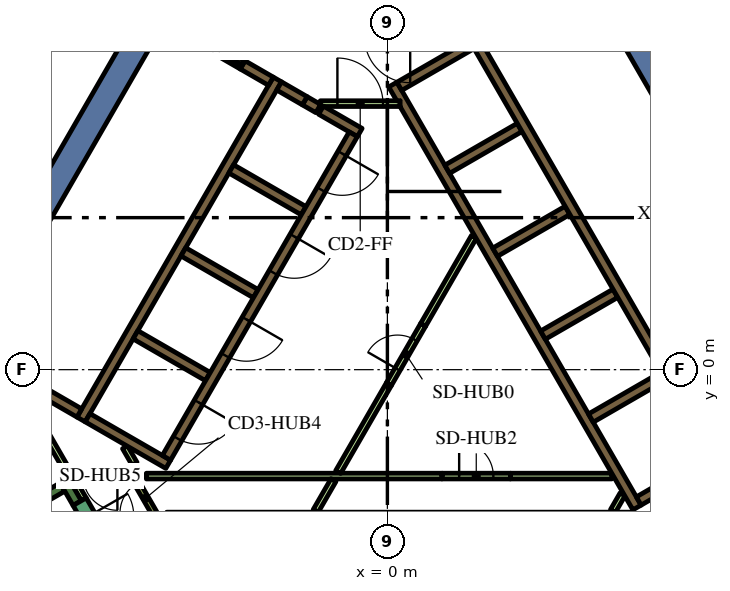
"""IFC4 building model, lengths in metres.
Left out: names, types, materials, properties, quantities, classifications, styles, units other than length and angle.
Written with IfcOpenShell. Run it as: python <this file> out.ifc"""

import sys

from ifc_helpers import new_model, si_unit, direction, frame, frame_2d, origin, place, context, subcontext, project, spatial, polyline, rectangle, outline, extrude, element, fill, save


model = new_model("IFC4")
c1 = context("Model", 3, precision=1e-05, world=origin(), true_north=direction((0.0, 1.0)))
c2 = subcontext(c1, "Body", "Model", "MODEL_VIEW")
j1 = project(units=[si_unit("LENGTHUNIT", "METRE"), si_unit("PLANEANGLEUNIT", "RADIAN")], contexts=[c1])
p1 = place(None, origin())
s1 = spatial("IfcSite", under=j1, at=p1, CompositionType="ELEMENT")
p2 = place(p1, origin())
s2 = spatial("IfcBuilding", under=s1, at=p2, CompositionType="ELEMENT")
p3 = place(p2, frame((0.0, 0.0, 214.2)))
s3 = spatial("IfcBuildingStorey", under=s2, at=p3, CompositionType="ELEMENT", Elevation=214.2)
p4 = place(p3, frame((8.235, 5.736, 0.0), z_axis=(0.0, 0.0, 1.0), x_axis=(-0.499983401189, 0.8660349869, 0.0)))
e1 = element("IfcWall", 1, at=p4, inside=s3, PredefinedType="SOLIDWALL", context=c2, shape_type="SweptSolid", body=[
    extrude(rectangle(XDim=12.472, YDim=0.7, at=frame_2d((6.236, 0.0))), origin(), (0.0, 0.0, 1.0), 4.2),
])
p5 = place(p3, frame((-4.696, 11.867, 0.0), z_axis=(0.0, 0.0, 1.0), x_axis=(-0.500003726532, -0.866023252259, 0.0)))
e2 = element("IfcWall", 2, at=p5, inside=s3, PredefinedType="SOLIDWALL", context=c2, shape_type="SweptSolid", body=[
    extrude(rectangle(XDim=12.848, YDim=0.7, at=frame_2d((6.424, 0.0))), origin(), (0.0, 0.0, 1.0), 4.2),
])
p6 = place(p3, frame((-14.44, -6.49, 0.0), z_axis=(0.0, 0.0, 1.0), x_axis=(0.866022966069, 0.500004222222, 0.0)))
e3 = element("IfcWall", 3, at=p6, inside=s3, PredefinedType="SOLIDWALL", context=c2, shape_type="SweptSolid", body=[
    extrude(rectangle(XDim=6.8, YDim=0.25, at=frame_2d((3.4, 0.0))), origin(), (0.0, 0.0, 1.0), 4.2),
])
p7 = place(p3, frame((-8.163, -3.511, 0.0), z_axis=(0.0, 0.0, 1.0), x_axis=(-0.499994068514, 0.866028828302, 0.0)))
e4 = element("IfcWall", 4, at=p7, inside=s3, PredefinedType="SOLIDWALL", context=c2, shape_type="SweptSolid", body=[
    extrude(rectangle(XDim=0.674, YDim=0.25, at=frame_2d((0.337, 0.0))), origin(), (0.0, 0.0, 1.0), 4.2),
])
p8 = place(p3, origin())
e5 = element("IfcWall", 5, at=p8, inside=s3, PredefinedType="SOLIDWALL", context=c2, shape_type="SweptSolid", body=[
    extrude(outline(polyline([(0.332, 6.925), (0.335, 6.925), (0.335, 6.925), (0.335, 6.925), (0.335, 7.075), (0.335, 7.075), (0.335, 7.075), (0.245, 7.075), (0.035, 7.439), (0.252, 7.564), (0.377, 7.348), (1.512, 5.382), (1.637, 5.165), (2.221, 4.153), (2.771, 3.199), (2.896, 2.983), (3.138, 2.564), (4.031, 1.017), (4.156, 0.801), (5.292, -1.165), (5.417, -1.382), (6.073, -2.519), (6.552, -3.348), (6.677, -3.564), (6.46, -3.689), (0.332, 6.925)])), origin(), (0.0, 0.0, 1.0), 4.2),
])
p9 = place(p3, frame((3.1, 9.064, 0.0), z_axis=(0.0, 0.0, 1.0), x_axis=(-0.866030133475, -0.499991807846, 0.0)))
e6 = element("IfcWall", 6, at=p9, inside=s3, PredefinedType="SOLIDWALL", context=c2, shape_type="SweptSolid", body=[
    extrude(rectangle(XDim=3.217, YDim=0.25, at=frame_2d((1.608, 0.0))), origin(), (0.0, 0.0, 1.0), 4.2),
])
p10 = place(p3, frame((1.574, 5.274, 0.0), z_axis=(0.0, 0.0, 1.0), x_axis=(0.866028486751, 0.499994660107, 0.0)))
e7 = element("IfcWall", 7, at=p10, inside=s3, PredefinedType="SOLIDWALL", context=c2, shape_type="SweptSolid", body=[
    extrude(rectangle(XDim=2.2, YDim=0.25, at=frame_2d((1.1, 0.0))), origin(), (0.0, 0.0, 1.0), 4.2),
])
for number, where, z_axis, x_axis in (
    (8, (2.834, 3.091, 0.0), (0.0, 0.0, 1.0), (0.866, 0.5, 0.0)),
    (9, (4.094, 0.909, 0.0), (0.0, 0.0, 1.0), (0.866, 0.5, 0.0)),
    (10, (5.354, -1.274, 0.0), (0.0, 0.0, 1.0), (0.866, 0.5, 0.0)),
):
    element("IfcWall", number, at=place(p3, frame(where, z_axis=z_axis, x_axis=x_axis)), inside=s3, PredefinedType="SOLIDWALL", context=c2, shape_type="SweptSolid", body=[
        extrude(rectangle(XDim=2.2, YDim=0.25, at=frame_2d((1.1, 0.0))), origin(), (0.0, 0.0, 1.0), 4.2),
    ])
p11 = place(p3, frame((11.507, -0.631, 0.0), z_axis=(0.0, 0.0, 1.0), x_axis=(-0.866011447264, -0.500024172624, 0.0)))
e11 = element("IfcWall", 11, at=p11, inside=s3, PredefinedType="SOLIDWALL", context=c2, shape_type="SweptSolid", body=[
    extrude(rectangle(XDim=5.65, YDim=0.25, at=frame_2d((2.825, 0.0))), origin(), (0.0, 0.0, 1.0), 4.2),
])
p12 = place(p3, frame((-8.06, -1.311, 0.0), z_axis=(0.0, 0.0, 1.0), x_axis=(0.50000273126, 0.866023826885, 0.0)))
e12 = element("IfcWall", 12, at=p12, inside=s3, PredefinedType="SOLIDWALL", context=c2, shape_type="SweptSolid", body=[
    extrude(rectangle(XDim=10.33, YDim=0.25, at=frame_2d((5.165, 0.0))), origin(), (0.0, 0.0, 1.0), 4.2),
])
p13 = place(p3, frame((-1.819, 6.87, 0.0), z_axis=(0.0, 0.0, 1.0), x_axis=(-0.866294599386, 0.499533449405, 0.0)))
e13 = element("IfcWall", 13, at=p13, inside=s3, PredefinedType="SOLIDWALL", context=c2, shape_type="SweptSolid", body=[
    extrude(rectangle(XDim=0.41, YDim=0.25, at=frame_2d((0.205, 0.0))), origin(), (0.0, 0.0, 1.0), 4.2),
])
p14 = place(p3, frame((-2.849, 7.465, 0.0), z_axis=(0.0, 0.0, 1.0), x_axis=(0.865955664968, -0.500120771724, 0.0)))
e14 = element("IfcWall", 14, at=p14, inside=s3, PredefinedType="SOLIDWALL", context=c2, shape_type="SweptSolid", body=[
    extrude(rectangle(XDim=0.778, YDim=0.25, at=frame_2d((0.389, 0.0))), origin(), (0.0, 0.0, 1.0), 4.2),
])
p15 = place(p3, frame((-0.728, 6.24, 0.0), z_axis=(0.0, 0.0, 1.0), x_axis=(-0.866002680491, 0.500039355833, 0.0)))
e15 = element("IfcWall", 15, at=p15, inside=s3, PredefinedType="SOLIDWALL", context=c2, shape_type="SweptSolid", body=[
    extrude(rectangle(XDim=1.178, YDim=0.25, at=frame_2d((0.589, 0.0))), origin(), (0.0, 0.0, 1.0), 4.2),
])
for number, where, z_axis, x_axis in (
    (16, (-2.204, 4.182, 0.0), (0.0, 0.0, 1.0), (-0.866, 0.5, 0.0)),
    (17, (-5.369, 3.1, 0.0), (0.0, 0.0, 1.0), (0.866, -0.5, 0.0)),
    (18, (-4.724, -0.182, 0.0), (0.0, 0.0, 1.0), (-0.866, 0.5, 0.0)),
):
    element("IfcWall", number, at=place(p3, frame(where, z_axis=z_axis, x_axis=x_axis)), inside=s3, PredefinedType="SOLIDWALL", context=c2, shape_type="SweptSolid", body=[
        extrude(rectangle(XDim=2.2, YDim=0.25, at=frame_2d((1.1, 0.0))), origin(), (0.0, 0.0, 1.0), 4.2),
    ])
p16 = place(p3, frame((-7.889, -1.265, 0.0), z_axis=(0.0, 0.0, 1.0), x_axis=(0.866057815567, -0.499943856944, 0.0)))
e19 = element("IfcWall", 19, at=p16, inside=s3, PredefinedType="SOLIDWALL", context=c2, shape_type="SweptSolid", body=[
    extrude(rectangle(XDim=2.45, YDim=0.25, at=frame_2d((1.225, 0.0))), origin(), (0.0, 0.0, 1.0), 4.2),
])
p17 = place(p3, frame((-9.95, -0.075, 0.0), z_axis=(0.0, 0.0, 1.0), x_axis=(0.865962177421, -0.500109495288, 0.0)))
e20 = element("IfcWall", 20, at=p17, inside=s3, PredefinedType="SOLIDWALL", context=c2, shape_type="SweptSolid", body=[
    extrude(rectangle(XDim=2.129, YDim=0.25, at=frame_2d((1.065, 0.0))), origin(), (0.0, 0.0, 1.0), 4.2),
])
p18 = place(p3, frame((-3.809, 8.019, 0.0), z_axis=(0.0, 0.0, 1.0), x_axis=(0.866010229787, -0.500026281214, 0.0)))
e21 = element("IfcWall", 21, at=p18, inside=s3, PredefinedType="SOLIDWALL", context=c2, shape_type="SweptSolid", body=[
    extrude(rectangle(XDim=0.858, YDim=0.25, at=frame_2d((0.429, 0.0))), origin(), (0.0, 0.0, 1.0), 4.2),
])
e22 = element("IfcWall", 22, at=p8, inside=s3, PredefinedType="SOLIDWALL", context=c2, shape_type="SweptSolid", body=[
    extrude(outline(polyline([(-3.748, 8.128), (-3.813, 8.015), (-4.027, 8.139), (-4.017, 8.156), (-4.008, 8.173), (-4.0, 8.192), (-3.995, 8.21), (-3.991, 8.23), (-3.99, 8.25), (-3.99, 8.268), (-3.748, 8.128)])), origin(), (0.0, 0.0, 1.0), 4.2),
])
p19 = place(p3, frame((-9.718, -0.417, 0.0), z_axis=(0.0, 0.0, 1.0), x_axis=(0.499966538646, -0.866044721844, 0.0)))
e23 = element("IfcWall", 23, at=p19, inside=s3, PredefinedType="PARTITIONING", context=c2, shape_type="SweptSolid", body=[
    extrude(rectangle(XDim=2.511, YDim=0.15, at=frame_2d((1.255, 0.0))), origin(), (0.0, 0.0, 1.0), 3.45),
])
p20 = place(p3, frame((0.941, 1.179, 0.0), z_axis=(0.0, 0.0, 1.0), x_axis=(0.499962406319, 0.866047107418, 0.0)))
e24 = element("IfcWall", 24, at=p20, inside=s3, PredefinedType="PARTITIONING", context=c2, shape_type="SweptSolid", body=[
    extrude(rectangle(XDim=2.672, YDim=0.15, at=frame_2d((1.336, 0.0))), origin(), (0.0, 0.0, 1.0), 3.45),
])
p21 = place(p3, frame((1.438, -2.8, 0.0), z_axis=(0.0, 0.0, 1.0), x_axis=(-1.0, 0.0, 0.0)))
e25 = element("IfcWall", 25, at=p21, inside=s3, PredefinedType="PARTITIONING", context=c2, shape_type="SweptSolid", body=[
    extrude(rectangle(XDim=7.781, YDim=0.15, at=frame_2d((3.891, 0.0))), origin(), (0.0, 0.0, 1.0), 3.45),
])
p22 = place(p3, frame((-1.418, -2.907, 0.0), z_axis=(0.0, 0.0, 1.0), x_axis=(-0.499978056798, -0.866038072327, 0.0)))
e26 = element("IfcWall", 26, at=p22, inside=s3, PredefinedType="PARTITIONING", context=c2, shape_type="SweptSolid", body=[
    extrude(rectangle(XDim=0.937, YDim=0.15, at=frame_2d((0.469, 0.0))), origin(), (0.0, 0.0, 1.0), 3.45),
])
for number, where, z_axis, x_axis in (
    (27, (-1.295, -2.693, 0.0), (0.0, 0.0, 1.0), (0.5, 0.866, 0.0)),
    (28, (3.238, -2.8, 0.0), (0.0, 0.0, 1.0), (1.0, 0.0, 0.0)),
):
    element("IfcWall", number, at=place(p3, frame(where, z_axis=z_axis, x_axis=x_axis)), inside=s3, PredefinedType="PARTITIONING", context=c2, shape_type="SweptSolid", body=[
        extrude(rectangle(XDim=2.672, YDim=0.15, at=frame_2d((1.336, 0.0))), origin(), (0.0, 0.0, 1.0), 3.45),
    ])
p23 = place(p3, frame((-6.653, -2.477, 0.0), z_axis=(0.0, 0.0, 1.0), x_axis=(-0.500002592159, 0.866023907196, 0.0)))
e29 = element("IfcWall", 29, at=p23, inside=s3, PredefinedType="PARTITIONING", context=c2, shape_type="SweptSolid", body=[
    extrude(rectangle(XDim=0.503, YDim=0.15, at=frame_2d((0.251, 0.0))), origin(), (0.0, 0.0, 1.0), 3.45),
])
p24 = place(p3, frame((-7.99, -3.412, 0.0), z_axis=(0.0, 0.0, 1.0), x_axis=(-0.499858525911, 0.866107068482, 0.0)))
e30 = element("IfcWall", 30, at=p24, inside=s3, PredefinedType="PARTITIONING", context=c2, shape_type="SweptSolid", body=[
    extrude(rectangle(XDim=0.466, YDim=0.15, at=frame_2d((0.233, 0.0))), origin(), (0.0, 0.0, 1.0), 3.45),
])
p25 = place(p3, frame((5.936, -3.718, 0.0), z_axis=(0.0, 0.0, 1.0), x_axis=(0.499890179513, 0.866088799389, 0.0)))
e31 = element("IfcWall", 31, at=p25, inside=s3, PredefinedType="PARTITIONING", context=c2, shape_type="SweptSolid", body=[
    extrude(rectangle(XDim=0.504, YDim=0.15, at=frame_2d((0.252, 0.0))), origin(), (0.0, 0.0, 1.0), 3.45),
])
p26 = place(p3, frame((8.565, -2.185, 0.0), z_axis=(0.0, 0.0, 1.0), x_axis=(-0.499997954832, 0.866026584559, 0.0)))
e32 = element("IfcWall", 32, at=p26, inside=s3, PredefinedType="SOLIDWALL", context=c2, shape_type="SweptSolid", body=[
    extrude(rectangle(XDim=12.35, YDim=0.25, at=frame_2d((6.175, 0.0))), origin(), (0.0, 0.0, 1.0), 4.2),
])
p27 = place(p26, frame((0.585, 0.0, 0.0)))
e33 = element("IfcOpeningElement", 33, at=p27, cuts=e32, PredefinedType="OPENING", context=c2, shape_type="SweptSolid", body=[
    extrude(rectangle(XDim=1.1, YDim=2.1, at=frame_2d((0.55, 1.05))), frame((0.0, 0.135, 0.0), z_axis=(0.0, -1.0, 0.0), x_axis=(1.0, 0.0, 0.0)), (0.0, 0.0, 1.0), 0.27),
])
p28 = place(p3, frame((-0.898, 6.194, 0.0), z_axis=(0.0, 0.0, 1.0), x_axis=(-0.499996202215, -0.866027596426, 0.0)))
e34 = element("IfcWall", 34, at=p28, inside=s3, PredefinedType="SOLIDWALL", context=c2, shape_type="SweptSolid", body=[
    extrude(rectangle(XDim=9.83, YDim=0.25, at=frame_2d((4.915, 0.0))), origin(), (0.0, 0.0, 1.0), 4.2),
])
p29 = place(p28, frame((0.585, 0.0, 0.0)))
e35 = element("IfcOpeningElement", 35, at=p29, cuts=e34, PredefinedType="OPENING", context=c2, shape_type="SweptSolid", body=[
    extrude(rectangle(XDim=1.1, YDim=2.1, at=frame_2d((0.55, 1.05))), frame((0.0, 0.135, 0.0), z_axis=(0.0, -1.0, 0.0), x_axis=(1.0, 0.0, 0.0)), (0.0, 0.0, 1.0), 0.27),
])
p30 = place(p28, frame((3.105, 0.0, 0.0)))
e36 = element("IfcOpeningElement", 36, at=p30, cuts=e34, PredefinedType="OPENING", context=c2, shape_type="SweptSolid", body=[
    extrude(rectangle(XDim=1.1, YDim=2.1, at=frame_2d((0.55, 1.05))), frame((0.0, 0.135, 0.0), z_axis=(0.0, -1.0, 0.0), x_axis=(1.0, 0.0, 0.0)), (0.0, 0.0, 1.0), 0.27),
])
p31 = place(p28, frame((5.625, 0.0, 0.0)))
e37 = element("IfcOpeningElement", 37, at=p31, cuts=e34, PredefinedType="OPENING", context=c2, shape_type="SweptSolid", body=[
    extrude(rectangle(XDim=1.1, YDim=2.1, at=frame_2d((0.55, 1.05))), frame((0.0, 0.135, 0.0), z_axis=(0.0, -1.0, 0.0), x_axis=(1.0, 0.0, 0.0)), (0.0, 0.0, 1.0), 0.27),
])
p32 = place(p28, frame((8.145, 0.0, 0.0)))
e38 = element("IfcOpeningElement", 38, at=p32, cuts=e34, PredefinedType="OPENING", context=c2, shape_type="SweptSolid", body=[
    extrude(rectangle(XDim=1.1, YDim=2.1, at=frame_2d((0.55, 1.05))), frame((0.0, 0.135, 0.0), z_axis=(0.0, -1.0, 0.0), x_axis=(1.0, 0.0, 0.0)), (0.0, 0.0, 1.0), 0.27),
])
p33 = place(p3, frame((7.048, -5.292, 0.0), z_axis=(0.0, 0.0, 1.0), x_axis=(0.49994051562, 0.866059744384, 0.0)))
e39 = element("IfcWall", 39, at=p33, inside=s3, PredefinedType="SOLIDWALL", context=c2, shape_type="SweptSolid", body=[
    extrude(rectangle(XDim=2.1, YDim=0.4, at=frame_2d((1.05, 0.0))), origin(), (0.0, 0.0, 1.0), 4.2),
])
p34 = place(p33, frame((0.45, 0.0, 0.0)))
e40 = element("IfcOpeningElement", 40, at=p34, cuts=e39, PredefinedType="OPENING", context=c2, shape_type="SweptSolid", body=[
    extrude(rectangle(XDim=1.2, YDim=2.1, at=frame_2d((0.6, 1.05))), frame((0.0, 0.21, 0.0), z_axis=(0.0, -1.0, 0.0), x_axis=(1.0, 0.0, 0.0)), (0.0, 0.0, 1.0), 0.42),
])
p35 = place(p3, frame((-8.098, -3.474, 0.0), z_axis=(0.0, 0.0, 1.0), x_axis=(0.49994051562, -0.866059744384, 0.0)))
e41 = element("IfcWall", 41, at=p35, inside=s3, PredefinedType="SOLIDWALL", context=c2, shape_type="SweptSolid", body=[
    extrude(rectangle(XDim=2.1, YDim=0.4, at=frame_2d((1.05, 0.0))), origin(), (0.0, 0.0, 1.0), 4.2),
])
p36 = place(p35, frame((0.45, 0.0, 0.0)))
e42 = element("IfcOpeningElement", 42, at=p36, cuts=e41, PredefinedType="OPENING", context=c2, shape_type="SweptSolid", body=[
    extrude(rectangle(XDim=1.2, YDim=2.1, at=frame_2d((0.6, 1.05))), frame((0.0, 0.21, 0.0), z_axis=(0.0, -1.0, 0.0), x_axis=(1.0, 0.0, 0.0)), (0.0, 0.0, 1.0), 0.42),
])
p37 = place(p3, frame((-1.765, 7.0, 0.0), z_axis=(0.0, 0.0, 1.0), x_axis=(1.0, 0.0, 0.0)))
e43 = element("IfcWall", 43, at=p37, inside=s3, PredefinedType="PARTITIONING", context=c2, shape_type="SweptSolid", body=[
    extrude(rectangle(XDim=2.1, YDim=0.15, at=frame_2d((1.05, 0.0))), origin(), (0.0, 0.0, 1.0), 3.45),
])
p38 = place(p37, frame((0.45, 0.0, 0.0)))
e44 = element("IfcOpeningElement", 44, at=p38, cuts=e43, PredefinedType="OPENING", context=c2, shape_type="SweptSolid", body=[
    extrude(rectangle(XDim=1.2, YDim=2.1, at=frame_2d((0.6, 1.05))), frame((0.0, 0.085, 0.0), z_axis=(0.0, -1.0, 0.0), x_axis=(1.0, 0.0, 0.0)), (0.0, 0.0, 1.0), 0.17),
])
p39 = place(p3, frame((-5.861, -4.248, 0.0), z_axis=(0.0, 0.0, 1.0), x_axis=(-0.500043646338, 0.866000203093, 0.0)))
e45 = element("IfcWall", 45, at=p39, inside=s3, PredefinedType="PARTITIONING", context=c2, shape_type="SweptSolid", body=[
    extrude(rectangle(XDim=1.93, YDim=0.15, at=frame_2d((0.965, 0.0))), origin(), (0.0, 0.0, 1.0), 4.2),
])
p40 = place(p39, frame((0.55, 0.0, 0.0)))
e46 = element("IfcOpeningElement", 46, at=p40, cuts=e45, PredefinedType="OPENING", context=c2, shape_type="SweptSolid", body=[
    extrude(rectangle(XDim=0.9, YDim=2.1, at=frame_2d((0.45, 1.05))), frame((0.0, 0.085, 0.0), z_axis=(0.0, -1.0, 0.0), x_axis=(1.0, 0.0, 0.0)), (0.0, 0.0, 1.0), 0.17),
])
p41 = place(p3, frame((-5.659, 9.012, 0.0), z_axis=(0.0, 0.0, 1.0), x_axis=(0.866009402589, -0.500027713859, 0.0)))
e47 = element("IfcWall", 47, at=p41, inside=s3, PredefinedType="PARTITIONING", context=c2, shape_type="SweptSolid", body=[
    extrude(rectangle(XDim=2.1, YDim=0.12, at=frame_2d((1.05, 0.0))), origin(), (0.0, 0.0, 1.0), 3.45),
])
p42 = place(p41, frame((0.45, 0.0, 0.0)))
e48 = element("IfcOpeningElement", 48, at=p42, cuts=e47, PredefinedType="OPENING", context=c2, shape_type="SweptSolid", body=[
    extrude(rectangle(XDim=1.2, YDim=2.1, at=frame_2d((0.6, 1.05))), frame((0.0, 0.07, 0.0), z_axis=(0.0, -1.0, 0.0), x_axis=(1.0, 0.0, 0.0)), (0.0, 0.0, 1.0), 0.14),
])
p43 = place(p3, frame((0.041, -0.379, 0.0), z_axis=(0.0, 0.0, 1.0), x_axis=(0.499961193289, 0.866047807691, 0.0)))
e49 = element("IfcWall", 49, at=p43, inside=s3, PredefinedType="PARTITIONING", context=c2, shape_type="SweptSolid", body=[
    extrude(rectangle(XDim=1.8, YDim=0.15, at=frame_2d((0.9, 0.0))), origin(), (0.0, 0.0, 1.0), 3.45),
])
p44 = place(p43, frame((0.45, 0.0, 0.0)))
e50 = element("IfcOpeningElement", 50, at=p44, cuts=e49, PredefinedType="OPENING", context=c2, shape_type="SweptSolid", body=[
    extrude(rectangle(XDim=0.9, YDim=2.1, at=frame_2d((0.45, 1.05))), frame((0.0, 0.085, 0.0), z_axis=(0.0, -1.0, 0.0), x_axis=(1.0, 0.0, 0.0)), (0.0, 0.0, 1.0), 0.17),
])
p45 = place(p3, frame((1.438, -2.8, 0.0), z_axis=(0.0, 0.0, 1.0), x_axis=(1.0, 0.0, 0.0)))
e51 = element("IfcWall", 51, at=p45, inside=s3, PredefinedType="PARTITIONING", context=c2, shape_type="SweptSolid", body=[
    extrude(rectangle(XDim=1.8, YDim=0.15, at=frame_2d((0.9, 0.0))), origin(), (0.0, 0.0, 1.0), 3.45),
])
p46 = place(p45, frame((0.45, 0.0, 0.0)))
e52 = element("IfcOpeningElement", 52, at=p46, cuts=e51, PredefinedType="OPENING", context=c2, shape_type="SweptSolid", body=[
    extrude(rectangle(XDim=0.9, YDim=2.1, at=frame_2d((0.45, 1.05))), frame((0.0, 0.085, 0.0), z_axis=(0.0, -1.0, 0.0), x_axis=(1.0, 0.0, 0.0)), (0.0, 0.0, 1.0), 0.17),
])
p47 = place(p3, frame((-6.655, -2.8, 0.0), z_axis=(0.0, 0.0, 1.0), x_axis=(-1.0, 0.0, 0.0)))
e53 = element("IfcWall", 53, at=p47, inside=s3, PredefinedType="PARTITIONING", context=c2, shape_type="SweptSolid", body=[
    extrude(rectangle(XDim=1.8, YDim=0.15, at=frame_2d((0.9, 0.0))), origin(), (0.0, 0.0, 1.0), 3.45),
])
p48 = place(p47, frame((0.45, 0.0, 0.0)))
e54 = element("IfcOpeningElement", 54, at=p48, cuts=e53, PredefinedType="OPENING", context=c2, shape_type="SweptSolid", body=[
    extrude(rectangle(XDim=0.9, YDim=2.1, at=frame_2d((0.45, 1.05))), frame((0.0, 0.085, 0.0), z_axis=(0.0, -1.0, 0.0), x_axis=(1.0, 0.0, 0.0)), (0.0, 0.0, 1.0), 0.17),
])
p49 = place(p3, frame((-8.522, 9.539, 0.0), z_axis=(0.0, 0.0, 1.0), x_axis=(-0.499997012787, -0.866027128446, 0.0)))
e55 = element("IfcWall", 55, at=p49, inside=s3, PredefinedType="PARTITIONING", context=c2, shape_type="SweptSolid", body=[
    extrude(rectangle(XDim=3.9, YDim=0.2, at=frame_2d((1.95, 0.0))), origin(), (0.0, 0.0, 1.0), 3.45),
])
p50 = place(p29, origin())
e56 = element("IfcDoor", 56, at=p50, inside=s3, OperationType="DOUBLE_DOOR_SLIDING", PredefinedType="DOOR", context=c2, shape_type="SweptSolid", body=[
    extrude(rectangle(XDim=1.1, YDim=2.1, at=frame_2d((0.55, 1.05))), frame((0.0, 0.025, 0.0), z_axis=(0.0, -1.0, 0.0), x_axis=(1.0, 0.0, 0.0)), (0.0, 0.0, 1.0), 0.05),
])
fill(e35, e56)
p51 = place(p30, origin())
e57 = element("IfcDoor", 57, at=p51, inside=s3, OperationType="DOUBLE_DOOR_SLIDING", PredefinedType="DOOR", context=c2, shape_type="SweptSolid", body=[
    extrude(rectangle(XDim=1.1, YDim=2.1, at=frame_2d((0.55, 1.05))), frame((0.0, 0.025, 0.0), z_axis=(0.0, -1.0, 0.0), x_axis=(1.0, 0.0, 0.0)), (0.0, 0.0, 1.0), 0.05),
])
fill(e36, e57)
p52 = place(p31, origin())
e58 = element("IfcDoor", 58, at=p52, inside=s3, OperationType="DOUBLE_DOOR_SLIDING", PredefinedType="DOOR", context=c2, shape_type="SweptSolid", body=[
    extrude(rectangle(XDim=1.1, YDim=2.1, at=frame_2d((0.55, 1.05))), frame((0.0, 0.025, 0.0), z_axis=(0.0, -1.0, 0.0), x_axis=(1.0, 0.0, 0.0)), (0.0, 0.0, 1.0), 0.05),
])
fill(e37, e58)
p53 = place(p32, origin())
e59 = element("IfcDoor", 59, at=p53, inside=s3, OperationType="DOUBLE_DOOR_SLIDING", PredefinedType="DOOR", context=c2, shape_type="SweptSolid", body=[
    extrude(rectangle(XDim=1.1, YDim=2.1, at=frame_2d((0.55, 1.05))), frame((0.0, 0.025, 0.0), z_axis=(0.0, -1.0, 0.0), x_axis=(1.0, 0.0, 0.0)), (0.0, 0.0, 1.0), 0.05),
])
fill(e38, e59)
p54 = place(p38, origin())
e60 = element("IfcDoor", 60, at=p54, inside=s3, OperationType="SINGLE_SWING_LEFT", PredefinedType="DOOR", context=c2, shape_type="SweptSolid", body=[
    extrude(rectangle(XDim=1.2, YDim=2.1, at=frame_2d((0.6, 1.05))), frame((0.0, 0.025, 0.0), z_axis=(0.0, -1.0, 0.0), x_axis=(1.0, 0.0, 0.0)), (0.0, 0.0, 1.0), 0.05),
])
fill(e44, e60)
p55 = place(p40, origin())
e61 = element("IfcDoor", 61, at=p55, inside=s3, OperationType="SINGLE_SWING_LEFT", PredefinedType="DOOR", context=c2, shape_type="SweptSolid", body=[
    extrude(rectangle(XDim=0.9, YDim=2.1, at=frame_2d((0.45, 1.05))), frame((0.0, 0.025, 0.0), z_axis=(0.0, -1.0, 0.0), x_axis=(1.0, 0.0, 0.0)), (0.0, 0.0, 1.0), 0.05),
])
fill(e46, e61)
p56 = place(p42, origin())
e62 = element("IfcDoor", 62, at=p56, inside=s3, OperationType="SINGLE_SWING_LEFT", PredefinedType="DOOR", context=c2, shape_type="SweptSolid", body=[
    extrude(rectangle(XDim=1.2, YDim=2.1, at=frame_2d((0.6, 1.05))), frame((0.0, 0.025, 0.0), z_axis=(0.0, -1.0, 0.0), x_axis=(1.0, 0.0, 0.0)), (0.0, 0.0, 1.0), 0.05),
])
fill(e48, e62)
p57 = place(p44, origin())
e63 = element("IfcDoor", 63, at=p57, inside=s3, OperationType="SINGLE_SWING_LEFT", PredefinedType="DOOR", context=c2, shape_type="SweptSolid", body=[
    extrude(rectangle(XDim=0.9, YDim=2.1, at=frame_2d((0.45, 1.05))), frame((0.0, 0.025, 0.0), z_axis=(0.0, -1.0, 0.0), x_axis=(1.0, 0.0, 0.0)), (0.0, 0.0, 1.0), 0.05),
])
fill(e50, e63)
p58 = place(p46, origin())
e64 = element("IfcDoor", 64, at=p58, inside=s3, OperationType="SINGLE_SWING_LEFT", PredefinedType="DOOR", context=c2, shape_type="SweptSolid", body=[
    extrude(rectangle(XDim=0.9, YDim=2.1, at=frame_2d((0.45, 1.05))), frame((0.0, 0.025, 0.0), z_axis=(0.0, -1.0, 0.0), x_axis=(1.0, 0.0, 0.0)), (0.0, 0.0, 1.0), 0.05),
])
fill(e52, e64)
p59 = place(p48, origin())
e65 = element("IfcDoor", 65, at=p59, inside=s3, OperationType="SINGLE_SWING_LEFT", PredefinedType="DOOR", context=c2, shape_type="SweptSolid", body=[
    extrude(rectangle(XDim=0.9, YDim=2.1, at=frame_2d((0.45, 1.05))), frame((0.0, 0.025, 0.0), z_axis=(0.0, -1.0, 0.0), x_axis=(1.0, 0.0, 0.0)), (0.0, 0.0, 1.0), 0.05),
])
fill(e54, e65)
save(model, sys.argv[1])
